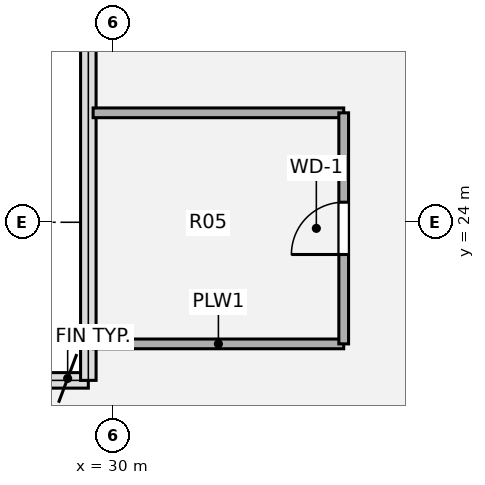
"""IFC4 building model, lengths in metres.
Left out: names, types, materials, properties, quantities, classifications, styles, units other than length and angle.
Written with IfcOpenShell. Run it as: python <this file> out.ifc"""

import sys

from ifc_helpers import new_model, si_unit, direction, frame, frame_2d, origin, origin_2d, place, context, subcontext, project, spatial, rectangle, extrude, source, transform, mapped, element, fill, save


model = new_model("IFC4")
c1 = context("Model", 3, precision=1e-05, world=origin(), true_north=direction((0.0, 1.0)))
c2 = subcontext(c1, "Body", "Model", "MODEL_VIEW")
j1 = project(units=[si_unit("LENGTHUNIT", "METRE"), si_unit("PLANEANGLEUNIT", "RADIAN")], contexts=[c1])
p1 = place(None, origin())
s1 = spatial("IfcSite", under=j1, at=p1, CompositionType="ELEMENT")
p2 = place(p1, origin())
s2 = spatial("IfcBuilding", under=s1, at=p2, CompositionType="ELEMENT")
p3 = place(p2, frame((0.0, 0.0, 287.28)))
s3 = spatial("IfcBuildingStorey", under=s2, at=p3, CompositionType="ELEMENT", Elevation=287.28)
p4 = place(p3, frame((29.678, 22.0, 0.0), z_axis=(0.0, 0.0, 1.0), x_axis=(1.0, 0.0, 0.0)))
e1 = element("IfcWall", 1, at=p4, inside=s3, PredefinedType="PLUMBINGWALL", context=c2, shape_type="SweptSolid", body=[
    extrude(rectangle(XDim=4.122, YDim=0.16, at=frame_2d((2.061, 0.0))), origin(), (0.0, 0.0, 1.0), 3.43),
])
p5 = place(p3, frame((29.679, 25.8, 0.0), z_axis=(0.0, 0.0, 1.0), x_axis=(1.0, 0.0, 0.0)))
e2 = element("IfcWall", 2, at=p5, inside=s3, PredefinedType="PLUMBINGWALL", context=c2, shape_type="SweptSolid", body=[
    extrude(rectangle(XDim=4.121, YDim=0.16, at=frame_2d((2.061, 0.0))), origin(), (0.0, 0.0, 1.0), 3.43),
])
p6 = place(p3, frame((33.8, 22.0, 0.0), z_axis=(0.0, 0.0, 1.0), x_axis=(0.0, 1.0, 0.0)))
e3 = element("IfcWall", 3, at=p6, inside=s3, PredefinedType="PLUMBINGWALL", context=c2, shape_type="SweptSolid", body=[
    extrude(rectangle(XDim=3.8, YDim=0.16, at=frame_2d((1.9, 0.0))), origin(), (0.0, 0.0, 1.0), 3.43),
])
p7 = place(p6, frame((1.47, 0.0, 0.0)))
e4 = element("IfcOpeningElement", 4, at=p7, cuts=e3, PredefinedType="OPENING", context=c2, shape_type="SweptSolid", body=[
    extrude(rectangle(XDim=0.86, YDim=2.1, at=origin_2d()), frame((0.43, 0.09, 1.05), z_axis=(0.0, -1.0, 0.0), x_axis=(1.0, 0.0, 0.0)), (0.0, 0.0, 1.0), 0.18),
])
m1 = source(origin(), c2, "Body", "SweptSolid", [
    extrude(rectangle(XDim=0.86, YDim=2.1, at=origin_2d()), frame((0.43, 0.025, 1.05), z_axis=(0.0, -1.0, 0.0), x_axis=(1.0, 0.0, 0.0)), (0.0, 0.0, 1.0), 0.05),
])
p8 = place(p7, origin())
e5 = element("IfcDoor", 5, at=p8, inside=s3, OperationType="SINGLE_SWING_LEFT", PredefinedType="DOOR", context=c2, shape_type="MappedRepresentation", body=[
    mapped(m1, transform((0.0, 0.0, 0.0), x_axis=(1.0, 0.0, 0.0), y_axis=(0.0, 1.0, 0.0), z_axis=(0.0, 0.0, 1.0), scale=1.0)),
])
fill(e4, e5)
save(model, sys.argv[1])
